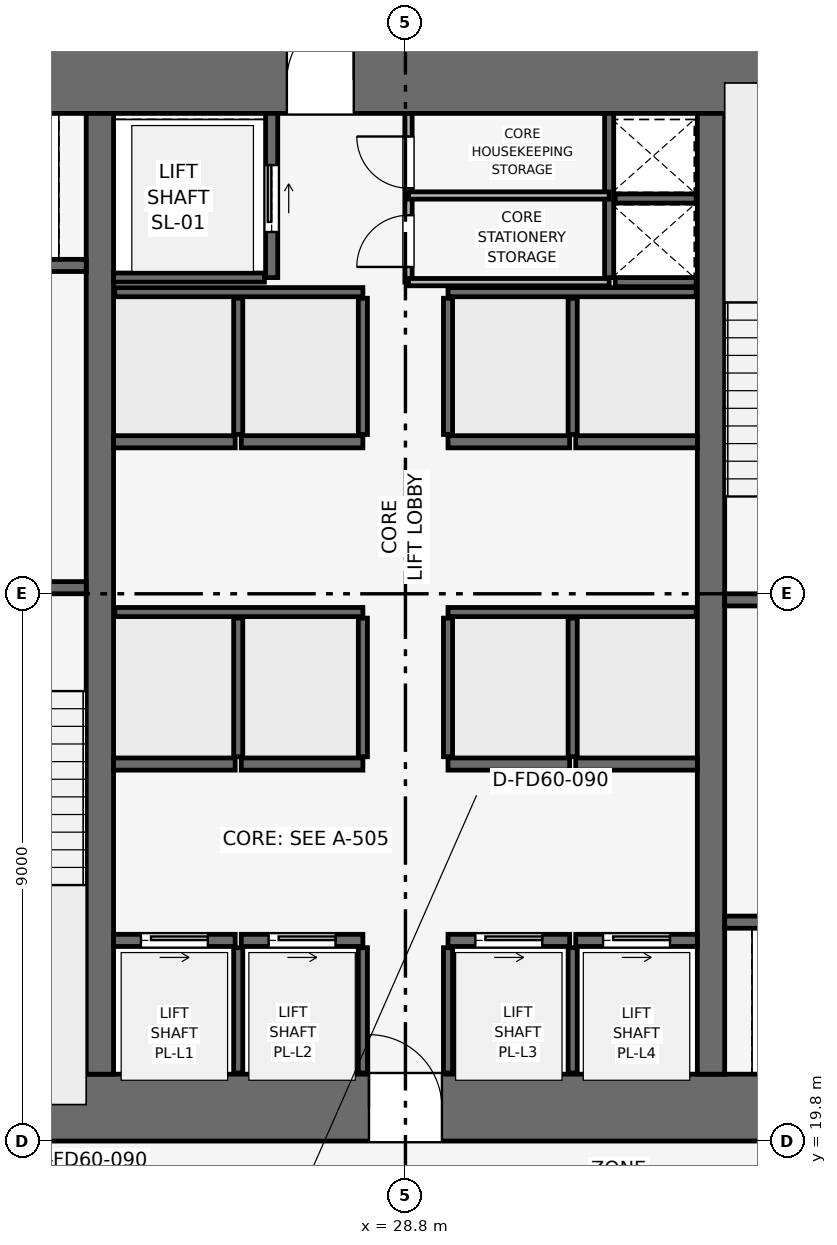
"""IFC4 building model, lengths in metres.
Left out: names, types, materials, properties, quantities, classifications, styles, units other than length and angle.
Written with IfcOpenShell. Run it as: python <this file> out.ifc"""

import sys

from ifc_helpers import new_model, si_unit, direction, frame, frame_2d, origin, place, context, subcontext, project, spatial, rectangle, extrude, element, fill, save


model = new_model("IFC4")
c1 = context("Model", 3, precision=1e-05, world=origin(), true_north=direction((0.0, 1.0)))
c2 = subcontext(c1, "Body", "Model", "MODEL_VIEW")
j1 = project(units=[si_unit("LENGTHUNIT", "METRE"), si_unit("PLANEANGLEUNIT", "RADIAN")], contexts=[c1])
p1 = place(None, origin())
s1 = spatial("IfcSite", under=j1, at=p1, CompositionType="ELEMENT")
p2 = place(p1, origin())
s2 = spatial("IfcBuilding", under=s1, at=p2, CompositionType="ELEMENT")
p3 = place(p2, frame((0.0, 0.0, 92.4)))
s3 = spatial("IfcBuildingStorey", under=s2, at=p3, CompositionType="ELEMENT", Elevation=92.4)
p4 = place(p3, frame((19.8, 20.35, 0.0), z_axis=(0.0, 0.0, 1.0), x_axis=(1.0, 0.0, 0.0)))
e1 = element("IfcWall", 1, at=p4, inside=s3, PredefinedType="SHEAR", context=c2, shape_type="SweptSolid", body=[
    extrude(rectangle(XDim=18.0, YDim=1.1, at=frame_2d((9.0, 0.0))), origin(), (0.0, 0.0, 1.0), 3.9),
])
p5 = place(p4, frame((8.4, 0.0, 0.0)))
e2 = element("IfcOpeningElement", 2, at=p5, cuts=e1, PredefinedType="OPENING", context=c2, shape_type="SweptSolid", body=[
    extrude(rectangle(XDim=1.2, YDim=2.2, at=frame_2d((0.6, 1.1))), frame((0.0, 0.56, 0.0), z_axis=(0.0, -1.0, 0.0), x_axis=(1.0, 0.0, 0.0)), (0.0, 0.0, 1.0), 1.12),
])
p6 = place(p3, frame((19.8, 37.25, 0.0), z_axis=(0.0, 0.0, 1.0), x_axis=(1.0, 0.0, 0.0)))
e3 = element("IfcWall", 3, at=p6, inside=s3, PredefinedType="SHEAR", context=c2, shape_type="SweptSolid", body=[
    extrude(rectangle(XDim=18.0, YDim=1.1, at=frame_2d((9.0, 0.0))), origin(), (0.0, 0.0, 1.0), 3.9),
])
p7 = place(p6, frame((7.05, 0.0, 0.0)))
e4 = element("IfcOpeningElement", 4, at=p7, cuts=e3, PredefinedType="OPENING", context=c2, shape_type="SweptSolid", body=[
    extrude(rectangle(XDim=1.1, YDim=2.15, at=frame_2d((0.55, 1.075))), frame((0.0, 0.56, 0.0), z_axis=(0.0, -1.0, 0.0), x_axis=(1.0, 0.0, 0.0)), (0.0, 0.0, 1.0), 1.12),
])
for number, where, z_axis, x_axis in (
    (5, (23.775, 20.9, 0.0), (0.0, 0.0, 1.0), (0.0, 1.0, 0.0)),
    (6, (33.825, 20.9, 0.0), (0.0, 0.0, 1.0), (0.0, 1.0, 0.0)),
):
    element("IfcWall", number, at=place(p3, frame(where, z_axis=z_axis, x_axis=x_axis)), inside=s3, PredefinedType="SHEAR", context=c2, shape_type="SweptSolid", body=[
        extrude(rectangle(XDim=15.8, YDim=0.45, at=frame_2d((7.9, 0.0))), origin(), (0.0, 0.0, 1.0), 3.9),
    ])
p8 = place(p3, frame((20.4, 28.9, 0.0), z_axis=(0.0, 0.0, 1.0), x_axis=(1.0, 0.0, 0.0)))
e7 = element("IfcWall", 7, at=p8, inside=s3, PredefinedType="SHEAR", context=c2, shape_type="SweptSolid", body=[
    extrude(rectangle(XDim=3.15, YDim=0.2, at=frame_2d((1.575, 0.0))), origin(), (0.0, 0.0, 1.0), 3.65),
])
p9 = place(p8, frame((0.8, 0.0, 0.0)))
e8 = element("IfcOpeningElement", 8, at=p9, cuts=e7, PredefinedType="OPENING", context=c2, shape_type="SweptSolid", body=[
    extrude(rectangle(XDim=1.0, YDim=2.1, at=frame_2d((0.5, 1.05))), frame((0.0, 0.11, 0.0), z_axis=(0.0, -1.0, 0.0), x_axis=(1.0, 0.0, 0.0)), (0.0, 0.0, 1.0), 0.22),
])
p10 = place(p3, frame((34.05, 28.7, 0.0), z_axis=(0.0, 0.0, 1.0), x_axis=(1.0, 0.0, 0.0)))
e9 = element("IfcWall", 9, at=p10, inside=s3, PredefinedType="SHEAR", context=c2, shape_type="SweptSolid", body=[
    extrude(rectangle(XDim=3.15, YDim=0.2, at=frame_2d((1.575, 0.0))), origin(), (0.0, 0.0, 1.0), 3.65),
])
p11 = place(p10, frame((0.8, 0.0, 0.0)))
e10 = element("IfcOpeningElement", 10, at=p11, cuts=e9, PredefinedType="OPENING", context=c2, shape_type="SweptSolid", body=[
    extrude(rectangle(XDim=1.0, YDim=2.1, at=frame_2d((0.5, 1.05))), frame((0.0, 0.11, 0.0), z_axis=(0.0, -1.0, 0.0), x_axis=(1.0, 0.0, 0.0)), (0.0, 0.0, 1.0), 0.22),
])
p12 = place(p3, frame((32.15, 34.0, 0.0), z_axis=(0.0, 0.0, 1.0), x_axis=(0.0, 1.0, 0.0)))
e11 = element("IfcWall", 11, at=p12, inside=s3, PredefinedType="SHEAR", context=c2, shape_type="SweptSolid", body=[
    extrude(rectangle(XDim=2.7, YDim=0.15, at=frame_2d((1.35, 0.0))), origin(), (0.0, 0.0, 1.0), 3.65),
])
for number, where, z_axis, x_axis in (
    (12, (32.25, 33.925, 0.0), (0.0, 0.0, 1.0), (1.0, 0.0, 0.0)),
    (13, (32.25, 35.3, 0.0), (0.0, 0.0, 1.0), (1.0, 0.0, 0.0)),
):
    element("IfcWall", number, at=place(p3, frame(where, z_axis=z_axis, x_axis=x_axis)), inside=s3, PredefinedType="SHEAR", context=c2, shape_type="SweptSolid", body=[
        extrude(rectangle(XDim=1.33, YDim=0.15, at=frame_2d((0.665, 0.0))), origin(), (0.0, 0.0, 1.0), 3.65),
    ])
p13 = place(p3, frame((20.5, 34.2, 0.0), z_axis=(0.0, 0.0, 1.0), x_axis=(1.0, 0.0, 0.0)))
e14 = element("IfcWall", 14, at=p13, inside=s3, PredefinedType="SHEAR", context=c2, shape_type="SweptSolid", body=[
    extrude(rectangle(XDim=3.05, YDim=0.2, at=frame_2d((1.525, 0.0))), origin(), (0.0, 0.0, 1.0), 3.65),
])
p14 = place(p13, frame((0.75, 0.0, 0.0)))
e15 = element("IfcOpeningElement", 15, at=p14, cuts=e14, PredefinedType="OPENING", context=c2, shape_type="SweptSolid", body=[
    extrude(rectangle(XDim=1.1, YDim=2.15, at=frame_2d((0.55, 1.075))), frame((0.0, 0.11, 0.0), z_axis=(0.0, -1.0, 0.0), x_axis=(1.0, 0.0, 0.0)), (0.0, 0.0, 1.0), 0.22),
])
p15 = place(p3, frame((34.05, 23.4, 0.0), z_axis=(0.0, 0.0, 1.0), x_axis=(1.0, 0.0, 0.0)))
e16 = element("IfcWall", 16, at=p15, inside=s3, PredefinedType="SHEAR", context=c2, shape_type="SweptSolid", body=[
    extrude(rectangle(XDim=3.05, YDim=0.2, at=frame_2d((1.525, 0.0))), origin(), (0.0, 0.0, 1.0), 3.65),
])
p16 = place(p15, frame((1.2, 0.0, 0.0)))
e17 = element("IfcOpeningElement", 17, at=p16, cuts=e16, PredefinedType="OPENING", context=c2, shape_type="SweptSolid", body=[
    extrude(rectangle(XDim=1.1, YDim=2.15, at=frame_2d((0.55, 1.075))), frame((0.0, 0.11, 0.0), z_axis=(0.0, -1.0, 0.0), x_axis=(1.0, 0.0, 0.0)), (0.0, 0.0, 1.0), 0.22),
])
p17 = place(p3, frame((26.6, 34.0, 0.0), z_axis=(0.0, 0.0, 1.0), x_axis=(0.0, 1.0, 0.0)))
e18 = element("IfcWall", 18, at=p17, inside=s3, PredefinedType="SHEAR", context=c2, shape_type="SweptSolid", body=[
    extrude(rectangle(XDim=2.7, YDim=0.2, at=frame_2d((1.35, 0.0))), origin(), (0.0, 0.0, 1.0), 3.65),
])
p18 = place(p17, frame((0.75, 0.0, 0.0)))
e19 = element("IfcOpeningElement", 19, at=p18, cuts=e18, PredefinedType="OPENING", context=c2, shape_type="SweptSolid", body=[
    extrude(rectangle(XDim=1.1, YDim=2.15, at=frame_2d((0.55, 1.075))), frame((0.0, 0.11, 0.0), z_axis=(0.0, -1.0, 0.0), x_axis=(1.0, 0.0, 0.0)), (0.0, 0.0, 1.0), 0.22),
])
p19 = place(p3, frame((24.0, 34.0, 0.0), z_axis=(0.0, 0.0, 1.0), x_axis=(1.0, 0.0, 0.0)))
e20 = element("IfcWall", 20, at=p19, inside=s3, PredefinedType="SHEAR", context=c2, shape_type="SweptSolid", body=[
    extrude(rectangle(XDim=2.48, YDim=0.15, at=frame_2d((1.24, 0.0))), origin(), (0.0, 0.0, 1.0), 3.65),
])
p20 = place(p3, frame((24.0, 23.1, 0.0), z_axis=(0.0, 0.0, 1.0), x_axis=(1.0, 0.0, 0.0)))
e21 = element("IfcWall", 21, at=p20, inside=s3, PredefinedType="SHEAR", context=c2, shape_type="SweptSolid", body=[
    extrude(rectangle(XDim=2.0, YDim=0.2, at=frame_2d((1.0, 0.0))), origin(), (0.0, 0.0, 1.0), 3.65),
])
p21 = place(p20, frame((0.45, 0.0, 0.0)))
e22 = element("IfcOpeningElement", 22, at=p21, cuts=e21, PredefinedType="OPENING", context=c2, shape_type="SweptSolid", body=[
    extrude(rectangle(XDim=1.1, YDim=2.15, at=frame_2d((0.55, 1.075))), frame((0.0, 0.11, 0.0), z_axis=(0.0, -1.0, 0.0), x_axis=(1.0, 0.0, 0.0)), (0.0, 0.0, 1.0), 0.22),
])
p22 = place(p3, frame((26.1, 23.1, 0.0), z_axis=(0.0, 0.0, 1.0), x_axis=(1.0, 0.0, 0.0)))
e23 = element("IfcWall", 23, at=p22, inside=s3, PredefinedType="SHEAR", context=c2, shape_type="SweptSolid", body=[
    extrude(rectangle(XDim=2.0, YDim=0.2, at=frame_2d((1.0, 0.0))), origin(), (0.0, 0.0, 1.0), 3.65),
])
p23 = place(p22, frame((0.45, 0.0, 0.0)))
e24 = element("IfcOpeningElement", 24, at=p23, cuts=e23, PredefinedType="OPENING", context=c2, shape_type="SweptSolid", body=[
    extrude(rectangle(XDim=1.1, YDim=2.15, at=frame_2d((0.55, 1.075))), frame((0.0, 0.11, 0.0), z_axis=(0.0, -1.0, 0.0), x_axis=(1.0, 0.0, 0.0)), (0.0, 0.0, 1.0), 0.22),
])
p24 = place(p3, frame((29.5, 23.1, 0.0), z_axis=(0.0, 0.0, 1.0), x_axis=(1.0, 0.0, 0.0)))
e25 = element("IfcWall", 25, at=p24, inside=s3, PredefinedType="SHEAR", context=c2, shape_type="SweptSolid", body=[
    extrude(rectangle(XDim=2.0, YDim=0.2, at=frame_2d((1.0, 0.0))), origin(), (0.0, 0.0, 1.0), 3.65),
])
p25 = place(p24, frame((0.45, 0.0, 0.0)))
e26 = element("IfcOpeningElement", 26, at=p25, cuts=e25, PredefinedType="OPENING", context=c2, shape_type="SweptSolid", body=[
    extrude(rectangle(XDim=1.1, YDim=2.15, at=frame_2d((0.55, 1.075))), frame((0.0, 0.11, 0.0), z_axis=(0.0, -1.0, 0.0), x_axis=(1.0, 0.0, 0.0)), (0.0, 0.0, 1.0), 0.22),
])
p26 = place(p3, frame((31.6, 23.1, 0.0), z_axis=(0.0, 0.0, 1.0), x_axis=(1.0, 0.0, 0.0)))
e27 = element("IfcWall", 27, at=p26, inside=s3, PredefinedType="SHEAR", context=c2, shape_type="SweptSolid", body=[
    extrude(rectangle(XDim=2.0, YDim=0.2, at=frame_2d((1.0, 0.0))), origin(), (0.0, 0.0, 1.0), 3.65),
])
p27 = place(p26, frame((0.45, 0.0, 0.0)))
e28 = element("IfcOpeningElement", 28, at=p27, cuts=e27, PredefinedType="OPENING", context=c2, shape_type="SweptSolid", body=[
    extrude(rectangle(XDim=1.1, YDim=2.15, at=frame_2d((0.55, 1.075))), frame((0.0, 0.11, 0.0), z_axis=(0.0, -1.0, 0.0), x_axis=(1.0, 0.0, 0.0)), (0.0, 0.0, 1.0), 0.22),
])
for number, where, z_axis, x_axis in (
    (29, (24.0, 26.0, 0.0), (0.0, 0.0, 1.0), (1.0, 0.0, 0.0)),
    (30, (26.1, 26.0, 0.0), (0.0, 0.0, 1.0), (1.0, 0.0, 0.0)),
    (31, (29.5, 26.0, 0.0), (0.0, 0.0, 1.0), (1.0, 0.0, 0.0)),
    (32, (31.6, 26.0, 0.0), (0.0, 0.0, 1.0), (1.0, 0.0, 0.0)),
    (33, (24.0, 31.3, 0.0), (0.0, 0.0, 1.0), (1.0, 0.0, 0.0)),
    (34, (26.1, 31.3, 0.0), (0.0, 0.0, 1.0), (1.0, 0.0, 0.0)),
    (35, (29.5, 31.3, 0.0), (0.0, 0.0, 1.0), (1.0, 0.0, 0.0)),
    (36, (31.6, 31.3, 0.0), (0.0, 0.0, 1.0), (1.0, 0.0, 0.0)),
):
    element("IfcWall", number, at=place(p3, frame(where, z_axis=z_axis, x_axis=x_axis)), inside=s3, PredefinedType="SHEAR", context=c2, shape_type="SweptSolid", body=[
        extrude(rectangle(XDim=2.0, YDim=0.2, at=frame_2d((1.0, 0.0))), origin(), (0.0, 0.0, 1.0), 3.65),
    ])
for number, where, z_axis, x_axis in (
    (37, (26.05, 20.92, 0.0), (0.0, 0.0, 1.0), (0.0, 1.0, 0.0)),
    (38, (28.1, 20.92, 0.0), (0.0, 0.0, 1.0), (0.0, 1.0, 0.0)),
    (39, (29.5, 20.92, 0.0), (0.0, 0.0, 1.0), (0.0, 1.0, 0.0)),
    (40, (31.55, 20.92, 0.0), (0.0, 0.0, 1.0), (0.0, 1.0, 0.0)),
):
    element("IfcWall", number, at=place(p3, frame(where, z_axis=z_axis, x_axis=x_axis)), inside=s3, PredefinedType="SHEAR", context=c2, shape_type="SweptSolid", body=[
        extrude(rectangle(XDim=2.06, YDim=0.15, at=frame_2d((1.03, 0.0))), origin(), (0.0, 0.0, 1.0), 3.65),
    ])
for number, where, z_axis, x_axis in (
    (41, (24.02, 28.5, 0.0), (0.0, 0.0, 1.0), (1.0, 0.0, 0.0)),
    (42, (29.5, 28.5, 0.0), (0.0, 0.0, 1.0), (1.0, 0.0, 0.0)),
):
    element("IfcWall", number, at=place(p3, frame(where, z_axis=z_axis, x_axis=x_axis)), inside=s3, PredefinedType="SHEAR", context=c2, shape_type="SweptSolid", body=[
        extrude(rectangle(XDim=4.08, YDim=0.15, at=frame_2d((2.04, 0.0))), origin(), (0.0, 0.0, 1.0), 3.65),
    ])
for number, where, z_axis, x_axis in (
    (43, (26.05, 26.12, 0.0), (0.0, 0.0, 1.0), (0.0, 1.0, 0.0)),
    (44, (28.1, 26.12, 0.0), (0.0, 0.0, 1.0), (0.0, 1.0, 0.0)),
    (45, (29.5, 26.12, 0.0), (0.0, 0.0, 1.0), (0.0, 1.0, 0.0)),
    (46, (31.55, 26.12, 0.0), (0.0, 0.0, 1.0), (0.0, 1.0, 0.0)),
):
    element("IfcWall", number, at=place(p3, frame(where, z_axis=z_axis, x_axis=x_axis)), inside=s3, PredefinedType="SHEAR", context=c2, shape_type="SweptSolid", body=[
        extrude(rectangle(XDim=2.28, YDim=0.15, at=frame_2d((1.14, 0.0))), origin(), (0.0, 0.0, 1.0), 3.65),
    ])
for number, where, z_axis, x_axis in (
    (47, (24.02, 33.76, 0.0), (0.0, 0.0, 1.0), (1.0, 0.0, 0.0)),
    (48, (29.5, 33.76, 0.0), (0.0, 0.0, 1.0), (1.0, 0.0, 0.0)),
):
    element("IfcWall", number, at=place(p3, frame(where, z_axis=z_axis, x_axis=x_axis)), inside=s3, PredefinedType="SHEAR", context=c2, shape_type="SweptSolid", body=[
        extrude(rectangle(XDim=4.08, YDim=0.15, at=frame_2d((2.04, 0.0))), origin(), (0.0, 0.0, 1.0), 3.65),
    ])
for number, where, z_axis, x_axis in (
    (49, (26.05, 31.42, 0.0), (0.0, 0.0, 1.0), (0.0, 1.0, 0.0)),
    (50, (28.1, 31.42, 0.0), (0.0, 0.0, 1.0), (0.0, 1.0, 0.0)),
    (51, (29.5, 31.42, 0.0), (0.0, 0.0, 1.0), (0.0, 1.0, 0.0)),
    (52, (31.55, 31.42, 0.0), (0.0, 0.0, 1.0), (0.0, 1.0, 0.0)),
):
    element("IfcWall", number, at=place(p3, frame(where, z_axis=z_axis, x_axis=x_axis)), inside=s3, PredefinedType="SHEAR", context=c2, shape_type="SweptSolid", body=[
        extrude(rectangle(XDim=2.24, YDim=0.15, at=frame_2d((1.12, 0.0))), origin(), (0.0, 0.0, 1.0), 3.65),
    ])
p28 = place(p3, frame((28.85, 33.925, 0.0), z_axis=(0.0, 0.0, 1.0), x_axis=(0.0, 1.0, 0.0)))
e53 = element("IfcWall", 53, at=p28, inside=s3, PredefinedType="PARTITIONING", context=c2, shape_type="SweptSolid", body=[
    extrude(rectangle(XDim=2.775, YDim=0.12, at=frame_2d((1.387, 0.0))), origin(), (0.0, 0.0, 1.0), 3.65),
])
p29 = place(p28, frame((0.25, 0.0, 0.0)))
e54 = element("IfcOpeningElement", 54, at=p29, cuts=e53, PredefinedType="OPENING", context=c2, shape_type="SweptSolid", body=[
    extrude(rectangle(XDim=0.85, YDim=2.1, at=frame_2d((0.425, 1.05))), frame((0.0, 0.07, 0.0), z_axis=(0.0, -1.0, 0.0), x_axis=(1.0, 0.0, 0.0)), (0.0, 0.0, 1.0), 0.14),
])
p30 = place(p28, frame((1.545, 0.0, 0.0)))
e55 = element("IfcOpeningElement", 55, at=p30, cuts=e53, PredefinedType="OPENING", context=c2, shape_type="SweptSolid", body=[
    extrude(rectangle(XDim=0.85, YDim=2.1, at=frame_2d((0.425, 1.05))), frame((0.0, 0.07, 0.0), z_axis=(0.0, -1.0, 0.0), x_axis=(1.0, 0.0, 0.0)), (0.0, 0.0, 1.0), 0.14),
])
for number, where, z_axis, x_axis in (
    (56, (28.85, 35.35, 0.0), (0.0, 0.0, 1.0), (1.0, 0.0, 0.0)),
    (57, (28.85, 33.925, 0.0), (0.0, 0.0, 1.0), (1.0, 0.0, 0.0)),
):
    element("IfcWall", number, at=place(p3, frame(where, z_axis=z_axis, x_axis=x_axis)), inside=s3, PredefinedType="PARTITIONING", context=c2, shape_type="SweptSolid", body=[
        extrude(rectangle(XDim=3.3, YDim=0.12, at=frame_2d((1.65, 0.0))), origin(), (0.0, 0.0, 1.0), 3.65),
    ])
p31 = place(p18, origin())
e58 = element("IfcDoor", 58, at=p31, inside=s3, OperationType="SLIDING_TO_RIGHT", PredefinedType="DOOR", context=c2, shape_type="SweptSolid", body=[
    extrude(rectangle(XDim=1.1, YDim=2.15, at=frame_2d((0.55, 1.075))), frame((0.0, 0.025, 0.0), z_axis=(0.0, -1.0, 0.0), x_axis=(1.0, 0.0, 0.0)), (0.0, 0.0, 1.0), 0.05),
])
fill(e19, e58)
p32 = place(p21, origin())
e59 = element("IfcDoor", 59, at=p32, inside=s3, OperationType="SLIDING_TO_RIGHT", PredefinedType="DOOR", context=c2, shape_type="SweptSolid", body=[
    extrude(rectangle(XDim=1.1, YDim=2.15, at=frame_2d((0.55, 1.075))), frame((0.0, 0.025, 0.0), z_axis=(0.0, -1.0, 0.0), x_axis=(1.0, 0.0, 0.0)), (0.0, 0.0, 1.0), 0.05),
])
fill(e22, e59)
p33 = place(p23, origin())
e60 = element("IfcDoor", 60, at=p33, inside=s3, OperationType="SLIDING_TO_RIGHT", PredefinedType="DOOR", context=c2, shape_type="SweptSolid", body=[
    extrude(rectangle(XDim=1.1, YDim=2.15, at=frame_2d((0.55, 1.075))), frame((0.0, 0.025, 0.0), z_axis=(0.0, -1.0, 0.0), x_axis=(1.0, 0.0, 0.0)), (0.0, 0.0, 1.0), 0.05),
])
fill(e24, e60)
p34 = place(p25, origin())
e61 = element("IfcDoor", 61, at=p34, inside=s3, OperationType="SLIDING_TO_RIGHT", PredefinedType="DOOR", context=c2, shape_type="SweptSolid", body=[
    extrude(rectangle(XDim=1.1, YDim=2.15, at=frame_2d((0.55, 1.075))), frame((0.0, 0.025, 0.0), z_axis=(0.0, -1.0, 0.0), x_axis=(1.0, 0.0, 0.0)), (0.0, 0.0, 1.0), 0.05),
])
fill(e26, e61)
p35 = place(p27, origin())
e62 = element("IfcDoor", 62, at=p35, inside=s3, OperationType="SLIDING_TO_RIGHT", PredefinedType="DOOR", context=c2, shape_type="SweptSolid", body=[
    extrude(rectangle(XDim=1.1, YDim=2.15, at=frame_2d((0.55, 1.075))), frame((0.0, 0.025, 0.0), z_axis=(0.0, -1.0, 0.0), x_axis=(1.0, 0.0, 0.0)), (0.0, 0.0, 1.0), 0.05),
])
fill(e28, e62)
p36 = place(p29, origin())
e63 = element("IfcDoor", 63, at=p36, inside=s3, OperationType="SINGLE_SWING_LEFT", PredefinedType="DOOR", context=c2, shape_type="SweptSolid", body=[
    extrude(rectangle(XDim=0.85, YDim=2.1, at=frame_2d((0.425, 1.05))), frame((0.0, 0.025, 0.0), z_axis=(0.0, -1.0, 0.0), x_axis=(1.0, 0.0, 0.0)), (0.0, 0.0, 1.0), 0.05),
])
fill(e54, e63)
p37 = place(p30, origin())
e64 = element("IfcDoor", 64, at=p37, inside=s3, OperationType="SINGLE_SWING_RIGHT", PredefinedType="DOOR", context=c2, shape_type="SweptSolid", body=[
    extrude(rectangle(XDim=0.85, YDim=2.1, at=frame_2d((0.425, 1.05))), frame((0.0, 0.025, 0.0), z_axis=(0.0, -1.0, 0.0), x_axis=(1.0, 0.0, 0.0)), (0.0, 0.0, 1.0), 0.05),
])
fill(e55, e64)
p38 = place(p5, origin())
e65 = element("IfcDoor", 65, at=p38, inside=s3, OperationType="SINGLE_SWING_LEFT", PredefinedType="DOOR", context=c2, shape_type="SweptSolid", body=[
    extrude(rectangle(XDim=1.2, YDim=2.2, at=frame_2d((0.6, 1.1))), frame((0.0, 0.025, 0.0), z_axis=(0.0, -1.0, 0.0), x_axis=(1.0, 0.0, 0.0)), (0.0, 0.0, 1.0), 0.05),
])
fill(e2, e65)
p39 = place(p7, origin())
e66 = element("IfcDoor", 66, at=p39, inside=s3, OperationType="SINGLE_SWING_RIGHT", PredefinedType="DOOR", context=c2, shape_type="SweptSolid", body=[
    extrude(rectangle(XDim=1.1, YDim=2.15, at=frame_2d((0.55, 1.075))), frame((0.0, 0.025, 0.0), z_axis=(0.0, -1.0, 0.0), x_axis=(1.0, 0.0, 0.0)), (0.0, 0.0, 1.0), 0.05),
])
fill(e4, e66)
save(model, sys.argv[1])
